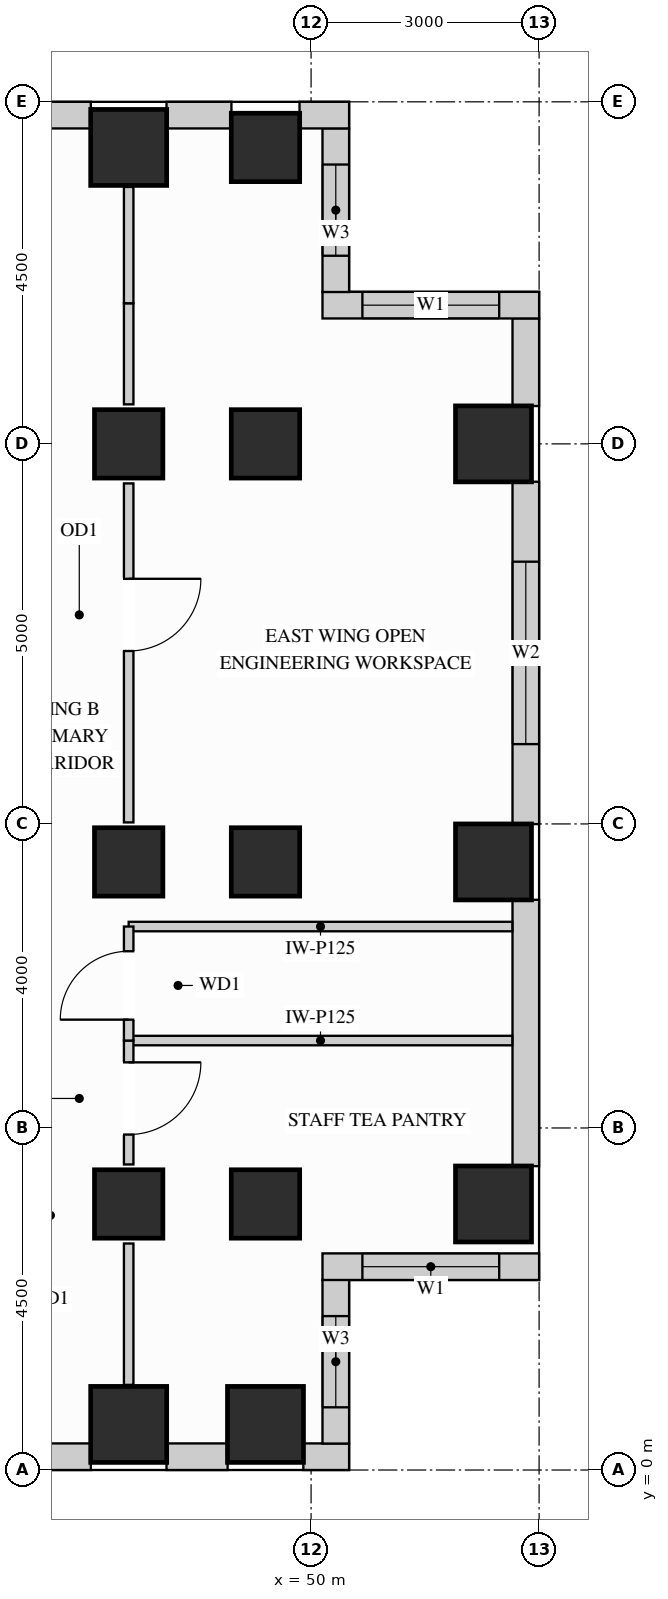
"""IFC4 building model, lengths in metres.
Left out: names, types, materials, properties, quantities, classifications, styles, units other than length and angle.
Written with IfcOpenShell. Run it as: python <this file> out.ifc"""

import sys

from ifc_helpers import new_model, si_unit, direction, frame, frame_2d, origin, origin_2d, place, context, subcontext, project, spatial, rectangle, extrude, source, transform, mapped, element, fill, save


model = new_model("IFC4")
c1 = context("Model", 3, precision=1e-05, world=origin(), true_north=direction((0.0, 1.0)))
c2 = subcontext(c1, "Body", "Model", "MODEL_VIEW")
j1 = project(units=[si_unit("LENGTHUNIT", "METRE"), si_unit("PLANEANGLEUNIT", "RADIAN")], contexts=[c1])
p1 = place(None, origin())
s1 = spatial("IfcSite", under=j1, at=p1, CompositionType="ELEMENT")
p2 = place(p1, origin())
s2 = spatial("IfcBuilding", under=s1, at=p2, CompositionType="ELEMENT")
p3 = place(p2, frame((0.0, 0.0, 150.3)))
s3 = spatial("IfcBuildingStorey", under=s2, at=p3, CompositionType="ELEMENT", Elevation=150.3)
m1 = source(origin(), c2, "Body", "SweptSolid", [
    extrude(rectangle(XDim=0.9, YDim=0.9, at=origin_2d()), origin(), (0.0, 0.0, 1.0), 3.4),
])
for number, where, z_axis, x_axis in (
    (1, (47.6, 13.5, 0.0), (0.0, 0.0, 1.0), (1.0, 0.0, 0.0)),
    (2, (47.6, 3.5, 0.0), (0.0, 0.0, 1.0), (1.0, 0.0, 0.0)),
    (3, (47.6, 8.0, 0.0), (0.0, 0.0, 1.0), (1.0, 0.0, 0.0)),
    (4, (49.4, 13.5, 0.0), (0.0, 0.0, 1.0), (1.0, 0.0, 0.0)),
    (5, (49.4, 17.4, 0.0), (0.0, 0.0, 1.0), (1.0, 0.0, 0.0)),
    (6, (49.4, 3.5, 0.0), (0.0, 0.0, 1.0), (1.0, 0.0, 0.0)),
    (7, (49.4, 8.0, 0.0), (0.0, 0.0, 1.0), (1.0, 0.0, 0.0)),
):
    element("IfcColumn", number, at=place(p3, frame(where, z_axis=z_axis, x_axis=x_axis)), inside=s3, PredefinedType="COLUMN", context=c2, shape_type="MappedRepresentation", body=[
        mapped(m1, transform((0.0, 0.0, 0.0), x_axis=(1.0, 0.0, 0.0), y_axis=(0.0, 1.0, 0.0), z_axis=(0.0, 0.0, 1.0))),
    ])
m2 = source(origin(), c2, "Body", "SweptSolid", [
    extrude(rectangle(XDim=1.0, YDim=1.0, at=origin_2d()), origin(), (0.0, 0.0, 1.0), 3.4),
])
for number, where, z_axis, x_axis in (
    (8, (47.6, 17.4, 0.0), (0.0, 0.0, 1.0), (1.0, 0.0, 0.0)),
    (9, (52.4, 13.5, 0.0), (0.0, 0.0, 1.0), (1.0, 0.0, 0.0)),
    (10, (52.4, 3.5, 0.0), (0.0, 0.0, 1.0), (1.0, 0.0, 0.0)),
    (11, (52.4, 8.0, 0.0), (0.0, 0.0, 1.0), (1.0, 0.0, 0.0)),
    (12, (47.6, 0.6, 0.0), (0.0, 0.0, 1.0), (1.0, 0.0, 0.0)),
    (13, (49.4, 0.6, 0.0), (0.0, 0.0, 1.0), (1.0, 0.0, 0.0)),
):
    element("IfcColumn", number, at=place(p3, frame(where, z_axis=z_axis, x_axis=x_axis)), inside=s3, PredefinedType="COLUMN", context=c2, shape_type="MappedRepresentation", body=[
        mapped(m2, transform((0.0, 0.0, 0.0), x_axis=(1.0, 0.0, 0.0), y_axis=(0.0, 1.0, 0.0), z_axis=(0.0, 0.0, 1.0))),
    ])
p4 = place(p3, frame((40.498, 0.175, 0.0), z_axis=(0.0, 0.0, 1.0), x_axis=(1.0, 0.0, 0.0)))
e14 = element("IfcWall", 14, at=p4, inside=s3, PredefinedType="SOLIDWALL", context=c2, shape_type="SweptSolid", body=[
    extrude(rectangle(XDim=6.604, YDim=0.35, at=frame_2d((3.302, 0.0))), origin(), (0.0, 0.0, 1.0), 2.612),
])
p5 = place(p4, frame((0.737, 0.0, 0.78)))
e15 = element("IfcOpeningElement", 15, at=p5, cuts=e14, PredefinedType="OPENING", context=c2, shape_type="SweptSolid", body=[
    extrude(rectangle(XDim=1.8, YDim=1.652, at=frame_2d((0.9, 0.826))), frame((0.0, 0.185, 0.0), z_axis=(0.0, -1.0, 0.0), x_axis=(1.0, 0.0, 0.0)), (0.0, 0.0, 1.0), 0.37),
])
p6 = place(p4, frame((2.955, 0.0, 0.78)))
e16 = element("IfcOpeningElement", 16, at=p6, cuts=e14, PredefinedType="OPENING", context=c2, shape_type="SweptSolid", body=[
    extrude(rectangle(XDim=1.8, YDim=1.652, at=frame_2d((0.9, 0.826))), frame((0.0, 0.185, 0.0), z_axis=(0.0, -1.0, 0.0), x_axis=(1.0, 0.0, 0.0)), (0.0, 0.0, 1.0), 0.37),
])
m3 = source(origin(), c2, "Body", "SweptSolid", [
    extrude(rectangle(XDim=0.804, YDim=0.35, at=frame_2d((0.402, 0.0))), origin(), (0.0, 0.0, 1.0), 3.385),
])
p7 = place(p3, frame((48.098, 0.175, 0.0), z_axis=(0.0, 0.0, 1.0), x_axis=(1.0, 0.0, 0.0)))
e17 = element("IfcWall", 17, at=p7, inside=s3, PredefinedType="SOLIDWALL", context=c2, shape_type="MappedRepresentation", body=[
    mapped(m3, transform((0.0, 0.0, 0.0), x_axis=(1.0, 0.0, 0.0), y_axis=(0.0, 1.0, 0.0), z_axis=(0.0, 0.0, 1.0))),
])
m4 = source(origin(), c2, "Body", "SweptSolid", [
    extrude(rectangle(XDim=0.602, YDim=0.35, at=frame_2d((0.301, 0.0))), origin(), (0.0, 0.0, 1.0), 3.385),
])
p8 = place(p3, frame((49.898, 0.175, 0.0), z_axis=(0.0, 0.0, 1.0), x_axis=(1.0, 0.0, 0.0)))
e18 = element("IfcWall", 18, at=p8, inside=s3, PredefinedType="SOLIDWALL", context=c2, shape_type="MappedRepresentation", body=[
    mapped(m4, transform((0.0, 0.0, 0.0), x_axis=(1.0, 0.0, 0.0), y_axis=(0.0, 1.0, 0.0), z_axis=(0.0, 0.0, 1.0))),
])
p9 = place(p3, frame((50.325, 0.348, 0.0), z_axis=(0.0, 0.0, 1.0), x_axis=(0.0, 1.0, 0.0)))
e19 = element("IfcWall", 19, at=p9, inside=s3, PredefinedType="SOLIDWALL", context=c2, shape_type="SweptSolid", body=[
    extrude(rectangle(XDim=2.154, YDim=0.35, at=frame_2d((1.077, 0.0))), origin(), (0.0, 0.0, 1.0), 3.385),
])
p10 = place(p9, frame((0.477, 0.0, 0.78)))
e20 = element("IfcOpeningElement", 20, at=p10, cuts=e19, PredefinedType="OPENING", context=c2, shape_type="SweptSolid", body=[
    extrude(rectangle(XDim=1.2, YDim=2.1, at=frame_2d((0.6, 1.05))), frame((0.0, 0.185, 0.0), z_axis=(0.0, -1.0, 0.0), x_axis=(1.0, 0.0, 0.0)), (0.0, 0.0, 1.0), 0.37),
])
p11 = place(p3, frame((50.15, 2.675, 0.0), z_axis=(0.0, 0.0, 1.0), x_axis=(1.0, 0.0, 0.0)))
e21 = element("IfcWall", 21, at=p11, inside=s3, PredefinedType="SOLIDWALL", context=c2, shape_type="SweptSolid", body=[
    extrude(rectangle(XDim=2.85, YDim=0.35, at=frame_2d((1.425, 0.0))), origin(), (0.0, 0.0, 1.0), 3.385),
])
p12 = place(p11, frame((0.525, 0.0, 0.78)))
e22 = element("IfcOpeningElement", 22, at=p12, cuts=e21, PredefinedType="OPENING", context=c2, shape_type="SweptSolid", body=[
    extrude(rectangle(XDim=1.8, YDim=2.1, at=frame_2d((0.9, 1.05))), frame((0.0, 0.185, 0.0), z_axis=(0.0, -1.0, 0.0), x_axis=(1.0, 0.0, 0.0)), (0.0, 0.0, 1.0), 0.37),
])
m5 = source(origin(), c2, "Body", "SweptSolid", [
    extrude(rectangle(XDim=3.504, YDim=0.35, at=frame_2d((1.752, 0.0))), origin(), (0.0, 0.0, 1.0), 2.612),
])
p13 = place(p3, frame((52.825, 3.998, 0.0), z_axis=(0.0, 0.0, 1.0), x_axis=(0.0, 1.0, 0.0)))
e23 = element("IfcWall", 23, at=p13, inside=s3, PredefinedType="SOLIDWALL", context=c2, shape_type="MappedRepresentation", body=[
    mapped(m5, transform((0.0, 0.0, 0.0), x_axis=(1.0, 0.0, 0.0), y_axis=(0.0, 1.0, 0.0), z_axis=(0.0, 0.0, 1.0))),
])
p14 = place(p3, frame((52.825, 8.498, 0.0), z_axis=(0.0, 0.0, 1.0), x_axis=(0.0, 1.0, 0.0)))
e24 = element("IfcWall", 24, at=p14, inside=s3, PredefinedType="SOLIDWALL", context=c2, shape_type="SweptSolid", body=[
    extrude(rectangle(XDim=4.504, YDim=0.35, at=frame_2d((2.252, 0.0))), origin(), (0.0, 0.0, 1.0), 2.612),
])
p15 = place(p14, frame((1.052, 0.0, 0.78)))
e25 = element("IfcOpeningElement", 25, at=p15, cuts=e24, PredefinedType="OPENING", context=c2, shape_type="SweptSolid", body=[
    extrude(rectangle(XDim=2.4, YDim=1.652, at=frame_2d((1.2, 0.826))), frame((0.0, 0.185, 0.0), z_axis=(0.0, -1.0, 0.0), x_axis=(1.0, 0.0, 0.0)), (0.0, 0.0, 1.0), 0.37),
])
m6 = source(origin(), c2, "Body", "SweptSolid", [
    extrude(rectangle(XDim=1.154, YDim=0.35, at=frame_2d((0.577, 0.0))), origin(), (0.0, 0.0, 1.0), 3.385),
])
p16 = place(p3, frame((52.825, 13.998, 0.0), z_axis=(0.0, 0.0, 1.0), x_axis=(0.0, 1.0, 0.0)))
e26 = element("IfcWall", 26, at=p16, inside=s3, PredefinedType="SOLIDWALL", context=c2, shape_type="MappedRepresentation", body=[
    mapped(m6, transform((0.0, 0.0, 0.0), x_axis=(1.0, 0.0, 0.0), y_axis=(0.0, 1.0, 0.0), z_axis=(0.0, 0.0, 1.0))),
])
p17 = place(p3, frame((53.0, 15.325, 0.0), z_axis=(0.0, 0.0, 1.0), x_axis=(-1.0, 0.0, 0.0)))
e27 = element("IfcWall", 27, at=p17, inside=s3, PredefinedType="SOLIDWALL", context=c2, shape_type="SweptSolid", body=[
    extrude(rectangle(XDim=2.85, YDim=0.35, at=frame_2d((1.425, 0.0))), origin(), (0.0, 0.0, 1.0), 3.385),
])
p18 = place(p17, frame((0.525, 0.0, 0.78)))
e28 = element("IfcOpeningElement", 28, at=p18, cuts=e27, PredefinedType="OPENING", context=c2, shape_type="SweptSolid", body=[
    extrude(rectangle(XDim=1.8, YDim=2.1, at=frame_2d((0.9, 1.05))), frame((0.0, 0.185, 0.0), z_axis=(0.0, -1.0, 0.0), x_axis=(1.0, 0.0, 0.0)), (0.0, 0.0, 1.0), 0.37),
])
p19 = place(p3, frame((50.325, 15.498, 0.0), z_axis=(0.0, 0.0, 1.0), x_axis=(0.0, 1.0, 0.0)))
e29 = element("IfcWall", 29, at=p19, inside=s3, PredefinedType="SOLIDWALL", context=c2, shape_type="SweptSolid", body=[
    extrude(rectangle(XDim=2.154, YDim=0.35, at=frame_2d((1.077, 0.0))), origin(), (0.0, 0.0, 1.0), 3.385),
])
p20 = place(p19, frame((0.477, 0.0, 0.78)))
e30 = element("IfcOpeningElement", 30, at=p20, cuts=e29, PredefinedType="OPENING", context=c2, shape_type="SweptSolid", body=[
    extrude(rectangle(XDim=1.2, YDim=2.1, at=frame_2d((0.6, 1.05))), frame((0.0, 0.185, 0.0), z_axis=(0.0, -1.0, 0.0), x_axis=(1.0, 0.0, 0.0)), (0.0, 0.0, 1.0), 0.37),
])
m7 = source(origin(), c2, "Body", "SweptSolid", [
    extrude(rectangle(XDim=0.652, YDim=0.35, at=frame_2d((0.326, 0.0))), origin(), (0.0, 0.0, 1.0), 3.385),
])
p21 = place(p3, frame((50.5, 17.825, 0.0), z_axis=(0.0, 0.0, 1.0), x_axis=(-1.0, 0.0, 0.0)))
e31 = element("IfcWall", 31, at=p21, inside=s3, PredefinedType="SOLIDWALL", context=c2, shape_type="MappedRepresentation", body=[
    mapped(m7, transform((0.0, 0.0, 0.0), x_axis=(1.0, 0.0, 0.0), y_axis=(0.0, 1.0, 0.0), z_axis=(0.0, 0.0, 1.0))),
])
m8 = source(origin(), c2, "Body", "SweptSolid", [
    extrude(rectangle(XDim=0.854, YDim=0.35, at=frame_2d((0.427, 0.0))), origin(), (0.0, 0.0, 1.0), 3.385),
])
p22 = place(p3, frame((48.952, 17.825, 0.0), z_axis=(0.0, 0.0, 1.0), x_axis=(-1.0, 0.0, 0.0)))
e32 = element("IfcWall", 32, at=p22, inside=s3, PredefinedType="SOLIDWALL", context=c2, shape_type="MappedRepresentation", body=[
    mapped(m8, transform((0.0, 0.0, 0.0), x_axis=(1.0, 0.0, 0.0), y_axis=(0.0, 1.0, 0.0), z_axis=(0.0, 0.0, 1.0))),
])
p23 = place(p3, frame((47.102, 17.825, 0.0), z_axis=(0.0, 0.0, 1.0), x_axis=(-1.0, 0.0, 0.0)))
e33 = element("IfcWall", 33, at=p23, inside=s3, PredefinedType="SOLIDWALL", context=c2, shape_type="SweptSolid", body=[
    extrude(rectangle(XDim=6.604, YDim=0.35, at=frame_2d((3.302, 0.0))), origin(), (0.0, 0.0, 1.0), 2.612),
])
p24 = place(p23, frame((1.849, 0.0, 0.78)))
e34 = element("IfcOpeningElement", 34, at=p24, cuts=e33, PredefinedType="OPENING", context=c2, shape_type="SweptSolid", body=[
    extrude(rectangle(XDim=1.8, YDim=1.652, at=frame_2d((0.9, 0.826))), frame((0.0, 0.185, 0.0), z_axis=(0.0, -1.0, 0.0), x_axis=(1.0, 0.0, 0.0)), (0.0, 0.0, 1.0), 0.37),
])
p25 = place(p23, frame((4.067, 0.0, 0.78)))
e35 = element("IfcOpeningElement", 35, at=p25, cuts=e33, PredefinedType="OPENING", context=c2, shape_type="SweptSolid", body=[
    extrude(rectangle(XDim=1.8, YDim=1.652, at=frame_2d((0.9, 0.826))), frame((0.0, 0.185, 0.0), z_axis=(0.0, -1.0, 0.0), x_axis=(1.0, 0.0, 0.0)), (0.0, 0.0, 1.0), 0.37),
])
m9 = source(origin(), c2, "Body", "SweptSolid", [
    extrude(rectangle(XDim=5.048, YDim=0.125, at=frame_2d((2.524, 0.0))), origin(), (0.0, 0.0, 1.0), 3.385),
])
for number, where, z_axis, x_axis in (
    (36, (47.6, 5.65, 0.0), (0.0, 0.0, 1.0), (1.0, 0.0, 0.0)),
    (37, (47.6, 7.15, 0.0), (0.0, 0.0, 1.0), (1.0, 0.0, 0.0)),
):
    element("IfcWall", number, at=place(p3, frame(where, z_axis=z_axis, x_axis=x_axis)), inside=s3, PredefinedType="PARTITIONING", context=c2, shape_type="MappedRepresentation", body=[
        mapped(m9, transform((0.0, 0.0, 0.0), x_axis=(1.0, 0.0, 0.0), y_axis=(0.0, 1.0, 0.0), z_axis=(0.0, 0.0, 1.0))),
    ])
p26 = place(p3, frame((47.6, 4.02, 0.0), z_axis=(0.0, 0.0, 1.0), x_axis=(0.0, 1.0, 0.0)))
e38 = element("IfcWall", 38, at=p26, inside=s3, PredefinedType="PARTITIONING", context=c2, shape_type="SweptSolid", body=[
    extrude(rectangle(XDim=1.63, YDim=0.125, at=frame_2d((0.815, 0.0))), origin(), (0.0, 0.0, 1.0), 2.773),
])
p27 = place(p26, frame((0.393, 0.0, 0.0)))
e39 = element("IfcOpeningElement", 39, at=p27, cuts=e38, PredefinedType="OPENING", context=c2, shape_type="SweptSolid", body=[
    extrude(rectangle(XDim=0.95, YDim=2.15, at=frame_2d((0.475, 1.075))), frame((0.0, 0.073, 0.0), z_axis=(0.0, -1.0, 0.0), x_axis=(1.0, 0.0, 0.0)), (0.0, 0.0, 1.0), 0.145),
])
m10 = source(origin(), c2, "Body", "SweptSolid", [
    extrude(rectangle(XDim=1.86, YDim=0.125, at=frame_2d((0.93, 0.0))), origin(), (0.0, 0.0, 1.0), 2.773),
])
p28 = place(p3, frame((47.6, 1.12, 0.0), z_axis=(0.0, 0.0, 1.0), x_axis=(0.0, 1.0, 0.0)))
e40 = element("IfcWall", 40, at=p28, inside=s3, PredefinedType="PARTITIONING", context=c2, shape_type="MappedRepresentation", body=[
    mapped(m10, transform((0.0, 0.0, 0.0), x_axis=(1.0, 0.0, 0.0), y_axis=(0.0, 1.0, 0.0), z_axis=(0.0, 0.0, 1.0))),
])
p29 = place(p3, frame((47.6, 8.52, 0.0), z_axis=(0.0, 0.0, 1.0), x_axis=(0.0, 1.0, 0.0)))
e41 = element("IfcWall", 41, at=p29, inside=s3, PredefinedType="PARTITIONING", context=c2, shape_type="SweptSolid", body=[
    extrude(rectangle(XDim=4.46, YDim=0.125, at=frame_2d((2.23, 0.0))), origin(), (0.0, 0.0, 1.0), 2.773),
])
p30 = place(p29, frame((2.255, 0.0, 0.0)))
e42 = element("IfcOpeningElement", 42, at=p30, cuts=e41, PredefinedType="OPENING", context=c2, shape_type="SweptSolid", body=[
    extrude(rectangle(XDim=0.95, YDim=2.15, at=frame_2d((0.475, 1.075))), frame((0.0, 0.073, 0.0), z_axis=(0.0, -1.0, 0.0), x_axis=(1.0, 0.0, 0.0)), (0.0, 0.0, 1.0), 0.145),
])
m11 = source(origin(), c2, "Body", "SweptSolid", [
    extrude(rectangle(XDim=1.33, YDim=0.125, at=frame_2d((0.665, 0.0))), origin(), (0.0, 0.0, 1.0), 2.773),
])
p31 = place(p3, frame((47.6, 14.02, 0.0), z_axis=(0.0, 0.0, 1.0), x_axis=(0.0, 1.0, 0.0)))
e43 = element("IfcWall", 43, at=p31, inside=s3, PredefinedType="PARTITIONING", context=c2, shape_type="MappedRepresentation", body=[
    mapped(m11, transform((0.0, 0.0, 0.0), x_axis=(1.0, 0.0, 0.0), y_axis=(0.0, 1.0, 0.0), z_axis=(0.0, 0.0, 1.0))),
])
m12 = source(origin(), c2, "Body", "SweptSolid", [
    extrude(rectangle(XDim=1.53, YDim=0.125, at=frame_2d((0.765, 0.0))), origin(), (0.0, 0.0, 1.0), 2.773),
])
p32 = place(p3, frame((47.6, 15.35, 0.0), z_axis=(0.0, 0.0, 1.0), x_axis=(0.0, 1.0, 0.0)))
e44 = element("IfcWall", 44, at=p32, inside=s3, PredefinedType="PARTITIONING", context=c2, shape_type="MappedRepresentation", body=[
    mapped(m12, transform((0.0, 0.0, 0.0), x_axis=(1.0, 0.0, 0.0), y_axis=(0.0, 1.0, 0.0), z_axis=(0.0, 0.0, 1.0))),
])
p33 = place(p3, frame((47.6, 5.65, 0.0), z_axis=(0.0, 0.0, 1.0), x_axis=(0.0, 1.0, 0.0)))
e45 = element("IfcWall", 45, at=p33, inside=s3, PredefinedType="PARTITIONING", context=c2, shape_type="SweptSolid", body=[
    extrude(rectangle(XDim=1.5, YDim=0.125, at=frame_2d((0.75, 0.0))), origin(), (0.0, 0.0, 1.0), 2.773),
])
p34 = place(p33, frame((0.275, 0.0, 0.0)))
e46 = element("IfcOpeningElement", 46, at=p34, cuts=e45, PredefinedType="OPENING", context=c2, shape_type="SweptSolid", body=[
    extrude(rectangle(XDim=0.9, YDim=2.15, at=frame_2d((0.45, 1.075))), frame((0.0, 0.073, 0.0), z_axis=(0.0, -1.0, 0.0), x_axis=(1.0, 0.0, 0.0)), (0.0, 0.0, 1.0), 0.145),
])
m13 = source(origin(), c2, "Body", "SweptSolid", [
    extrude(rectangle(XDim=0.95, YDim=2.15, at=frame_2d((0.475, 1.075))), frame((0.0, 0.025, 0.0), z_axis=(0.0, -1.0, 0.0), x_axis=(1.0, 0.0, 0.0)), (0.0, 0.0, 1.0), 0.05),
])
p35 = place(p27, origin())
e47 = element("IfcDoor", 47, at=p35, inside=s3, OperationType="SINGLE_SWING_RIGHT", PredefinedType="DOOR", context=c2, shape_type="MappedRepresentation", body=[
    mapped(m13, transform((0.0, 0.0, 0.0), x_axis=(1.0, 0.0, 0.0), y_axis=(0.0, 1.0, 0.0), z_axis=(0.0, 0.0, 1.0))),
])
fill(e39, e47)
p36 = place(p30, origin())
e48 = element("IfcDoor", 48, at=p36, inside=s3, OperationType="SINGLE_SWING_RIGHT", PredefinedType="DOOR", context=c2, shape_type="MappedRepresentation", body=[
    mapped(m13, transform((0.0, 0.0, 0.0), x_axis=(1.0, 0.0, 0.0), y_axis=(0.0, 1.0, 0.0), z_axis=(0.0, 0.0, 1.0))),
])
fill(e42, e48)
m14 = source(origin(), c2, "Body", "SweptSolid", [
    extrude(rectangle(XDim=0.9, YDim=2.15, at=frame_2d((0.45, 1.075))), frame((0.0, 0.025, 0.0), z_axis=(0.0, -1.0, 0.0), x_axis=(1.0, 0.0, 0.0)), (0.0, 0.0, 1.0), 0.05),
])
p37 = place(p34, origin())
e49 = element("IfcDoor", 49, at=p37, inside=s3, OperationType="SINGLE_SWING_LEFT", PredefinedType="DOOR", context=c2, shape_type="MappedRepresentation", body=[
    mapped(m14, transform((0.0, 0.0, 0.0), x_axis=(1.0, 0.0, 0.0), y_axis=(0.0, 1.0, 0.0), z_axis=(0.0, 0.0, 1.0))),
])
fill(e46, e49)
m15 = source(origin(), c2, "Body", "SweptSolid", [
    extrude(rectangle(XDim=1.8, YDim=2.1, at=frame_2d((0.9, 1.05))), frame((0.0, 0.03, 0.0), z_axis=(0.0, -1.0, 0.0), x_axis=(1.0, 0.0, 0.0)), (0.0, 0.0, 1.0), 0.06),
])
p38 = place(p12, origin())
e50 = element("IfcWindow", 50, at=p38, inside=s3, PartitioningType="SINGLE_PANEL", PredefinedType="WINDOW", context=c2, shape_type="MappedRepresentation", body=[
    mapped(m15, transform((0.0, 0.0, 0.0), x_axis=(1.0, 0.0, 0.0), y_axis=(0.0, 1.0, 0.0), z_axis=(0.0, 0.0, 1.0))),
])
fill(e22, e50)
p39 = place(p18, origin())
e51 = element("IfcWindow", 51, at=p39, inside=s3, PartitioningType="SINGLE_PANEL", PredefinedType="WINDOW", context=c2, shape_type="MappedRepresentation", body=[
    mapped(m15, transform((0.0, 0.0, 0.0), x_axis=(1.0, 0.0, 0.0), y_axis=(0.0, 1.0, 0.0), z_axis=(0.0, 0.0, 1.0))),
])
fill(e28, e51)
m16 = source(origin(), c2, "Body", "SweptSolid", [
    extrude(rectangle(XDim=2.4, YDim=1.652, at=frame_2d((1.2, 0.826))), frame((0.0, 0.03, 0.0), z_axis=(0.0, -1.0, 0.0), x_axis=(1.0, 0.0, 0.0)), (0.0, 0.0, 1.0), 0.06),
])
p40 = place(p15, origin())
e52 = element("IfcWindow", 52, at=p40, inside=s3, PartitioningType="SINGLE_PANEL", PredefinedType="WINDOW", context=c2, shape_type="MappedRepresentation", body=[
    mapped(m16, transform((0.0, 0.0, 0.0), x_axis=(1.0, 0.0, 0.0), y_axis=(0.0, 1.0, 0.0), z_axis=(0.0, 0.0, 1.0))),
])
fill(e25, e52)
m17 = source(origin(), c2, "Body", "SweptSolid", [
    extrude(rectangle(XDim=1.2, YDim=2.1, at=frame_2d((0.6, 1.05))), frame((0.0, 0.03, 0.0), z_axis=(0.0, -1.0, 0.0), x_axis=(1.0, 0.0, 0.0)), (0.0, 0.0, 1.0), 0.06),
])
p41 = place(p10, origin())
e53 = element("IfcWindow", 53, at=p41, inside=s3, PartitioningType="SINGLE_PANEL", PredefinedType="WINDOW", context=c2, shape_type="MappedRepresentation", body=[
    mapped(m17, transform((0.0, 0.0, 0.0), x_axis=(1.0, 0.0, 0.0), y_axis=(0.0, 1.0, 0.0), z_axis=(0.0, 0.0, 1.0))),
])
fill(e20, e53)
p42 = place(p20, origin())
e54 = element("IfcWindow", 54, at=p42, inside=s3, PartitioningType="SINGLE_PANEL", PredefinedType="WINDOW", context=c2, shape_type="MappedRepresentation", body=[
    mapped(m17, transform((0.0, 0.0, 0.0), x_axis=(1.0, 0.0, 0.0), y_axis=(0.0, 1.0, 0.0), z_axis=(0.0, 0.0, 1.0))),
])
fill(e30, e54)
save(model, sys.argv[1])
